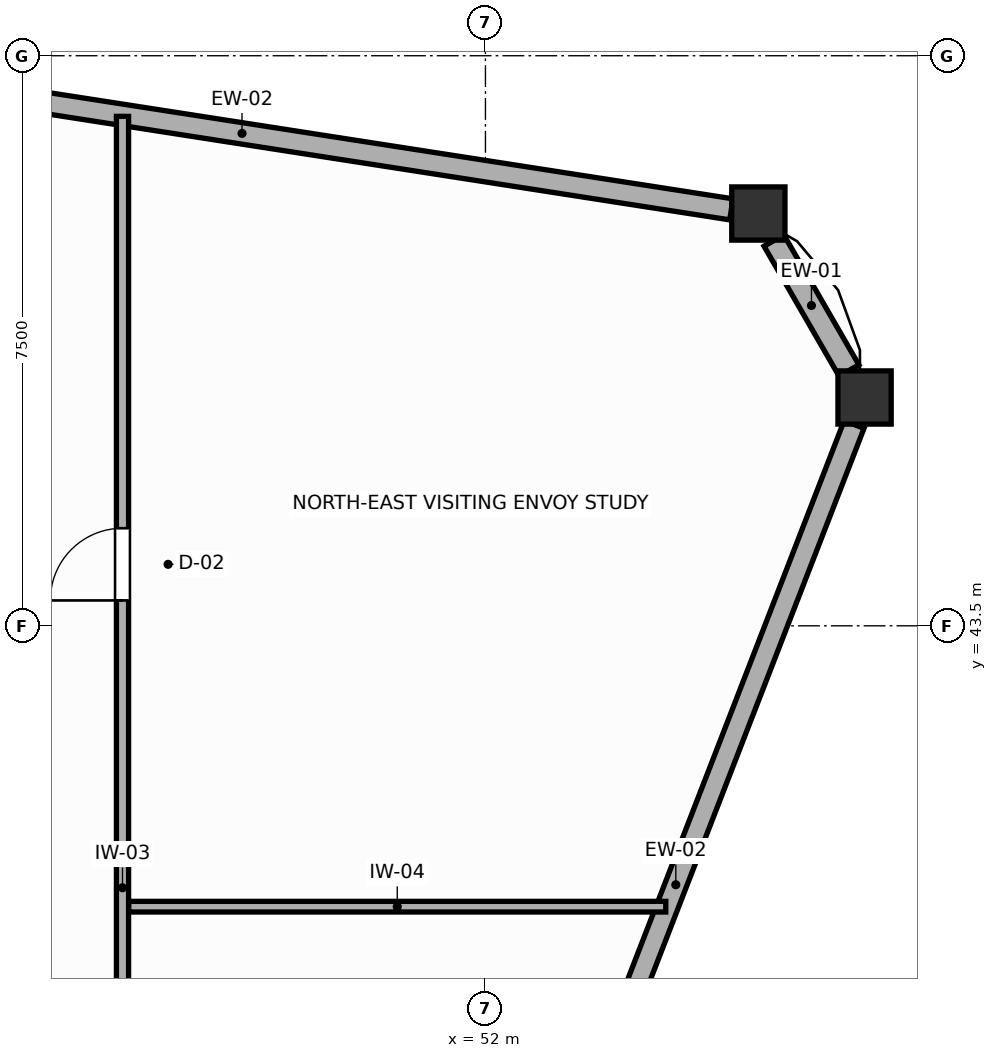
"""IFC4 building model, lengths in metres.
Left out: names, types, materials, properties, quantities, classifications, styles, units other than length and angle.
Written with IfcOpenShell. Run it as: python <this file> out.ifc"""

import sys

from ifc_helpers import new_model, si_unit, direction, frame, frame_2d, origin, origin_2d, place, context, subcontext, project, spatial, rectangle, extrude, source, transform, mapped, element, fill, save


model = new_model("IFC4")
c1 = context("Model", 3, precision=1e-05, world=origin(), true_north=direction((0.0, 1.0)))
c2 = subcontext(c1, "Body", "Model", "MODEL_VIEW")
j1 = project(units=[si_unit("LENGTHUNIT", "METRE"), si_unit("PLANEANGLEUNIT", "RADIAN")], contexts=[c1])
p1 = place(None, origin())
s1 = spatial("IfcSite", under=j1, at=p1, CompositionType="ELEMENT")
p2 = place(p1, origin())
s2 = spatial("IfcBuilding", under=s1, at=p2, CompositionType="ELEMENT")
p3 = place(p2, frame((0.0, 0.0, 250.2)))
s3 = spatial("IfcBuildingStorey", under=s2, at=p3, CompositionType="ELEMENT", Elevation=250.2)
m1 = source(origin(), c2, "Body", "SweptSolid", [
    extrude(rectangle(XDim=0.7, YDim=0.7, at=origin_2d()), origin(), (0.0, 0.0, 1.0), 3.6),
])
for number, where, z_axis, x_axis in (
    (1, (56.988, 46.504, 0.0), (0.0, 0.0, 1.0), (1.0, 0.0, 0.0)),
    (2, (55.59, 48.924, 0.0), (0.0, 0.0, 1.0), (1.0, 0.0, 0.0)),
):
    element("IfcColumn", number, at=place(p3, frame(where, z_axis=z_axis, x_axis=x_axis)), inside=s3, PredefinedType="COLUMN", context=c2, shape_type="MappedRepresentation", body=[
        mapped(m1, transform((0.0, 0.0, 0.0), scale=1.0)),
    ])
p4 = place(p3, frame((56.783, 46.859, 0.0), z_axis=(0.0, 0.0, 1.0), x_axis=(-0.499915072674, 0.866074431047, 0.0)))
e3 = element("IfcWall", 3, at=p4, inside=s3, PredefinedType="SOLIDWALL", context=c2, shape_type="SweptSolid", body=[
    extrude(rectangle(XDim=1.975, YDim=0.3, at=frame_2d((0.987, 0.0))), origin(), (0.0, 0.0, 1.0), 1.88),
])
p5 = place(p3, frame((55.235, 48.979, 0.0), z_axis=(0.0, 0.0, 1.0), x_axis=(-0.988170476673, 0.153359411293, 0.0)))
e4 = element("IfcWall", 4, at=p5, inside=s3, PredefinedType="SOLIDWALL", context=c2, shape_type="SweptSolid", body=[
    extrude(rectangle(XDim=13.03, YDim=0.28, at=frame_2d((6.515, 0.0))), origin(), (0.0, 0.0, 1.0), 1.88),
])
p6 = place(p3, frame((52.158, 34.039, 0.0), z_axis=(0.0, 0.0, 1.0), x_axis=(0.361269378379, 0.93246149317, 0.0)))
e5 = element("IfcWall", 5, at=p6, inside=s3, PredefinedType="SOLIDWALL", context=c2, shape_type="SweptSolid", body=[
    extrude(rectangle(XDim=12.987, YDim=0.28, at=frame_2d((6.494, 0.0))), origin(), (0.0, 0.0, 1.0), 1.88),
])
p7 = place(p3, frame((47.225, 32.31, 0.0), z_axis=(0.0, 0.0, 1.0), x_axis=(0.0, 1.0, 0.0)))
e6 = element("IfcWall", 6, at=p7, inside=s3, PredefinedType="PARTITIONING", context=c2, shape_type="SweptSolid", body=[
    extrude(rectangle(XDim=17.892, YDim=0.16, at=frame_2d((8.946, 0.0))), origin(), (0.0, 0.0, 1.0), 3.41),
])
p8 = place(p7, frame((3.014, 0.0, 0.0)))
e7 = element("IfcOpeningElement", 7, at=p8, cuts=e6, PredefinedType="OPENING", context=c2, shape_type="SweptSolid", body=[
    extrude(rectangle(XDim=0.95, YDim=2.05, at=frame_2d((0.475, 1.025))), frame((0.0, 0.09, 0.0), z_axis=(0.0, -1.0, 0.0), x_axis=(1.0, 0.0, 0.0)), (0.0, 0.0, 1.0), 0.18),
])
p9 = place(p7, frame((11.524, 0.0, 0.0)))
e8 = element("IfcOpeningElement", 8, at=p9, cuts=e6, PredefinedType="OPENING", context=c2, shape_type="SweptSolid", body=[
    extrude(rectangle(XDim=0.95, YDim=2.05, at=frame_2d((0.475, 1.025))), frame((0.0, 0.09, 0.0), z_axis=(0.0, -1.0, 0.0), x_axis=(1.0, 0.0, 0.0)), (0.0, 0.0, 1.0), 0.18),
])
p10 = place(p3, frame((47.307, 39.805, 0.0), z_axis=(0.0, 0.0, 1.0), x_axis=(1.0, 0.0, 0.0)))
e9 = element("IfcWall", 9, at=p10, inside=s3, PredefinedType="PARTITIONING", context=c2, shape_type="SweptSolid", body=[
    extrude(rectangle(XDim=7.066, YDim=0.14, at=frame_2d((3.533, 0.0))), origin(), (0.0, 0.0, 1.0), 3.41),
])
p11 = place(p9, origin())
e10 = element("IfcDoor", 10, at=p11, inside=s3, OperationType="SINGLE_SWING_LEFT", PredefinedType="DOOR", context=c2, shape_type="SweptSolid", body=[
    extrude(rectangle(XDim=0.95, YDim=2.05, at=frame_2d((0.475, 1.025))), frame((0.0, 0.025, 0.0), z_axis=(0.0, -1.0, 0.0), x_axis=(1.0, 0.0, 0.0)), (0.0, 0.0, 1.0), 0.05),
])
fill(e8, e10)
save(model, sys.argv[1])
